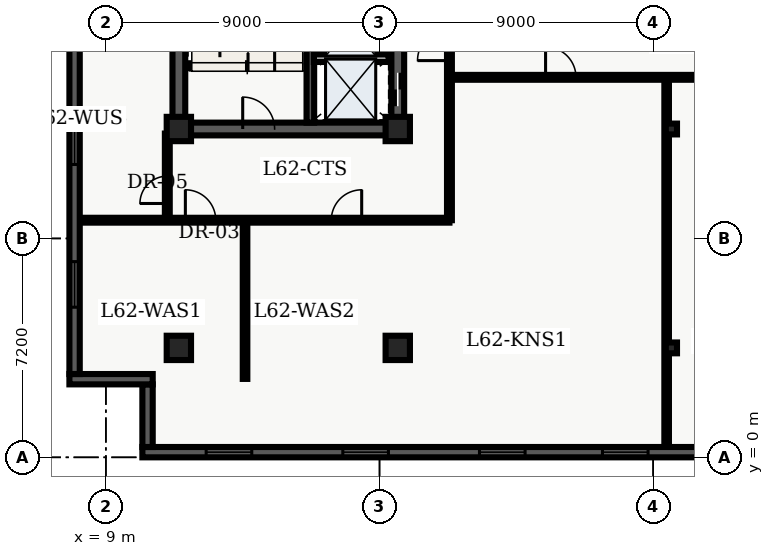
"""IFC4 building model, lengths in metres.
Left out: names, types, materials, properties, quantities, classifications, styles, units other than length and angle.
Written with IfcOpenShell. Run it as: python <this file> out.ifc"""

import sys

from ifc_helpers import new_model, entity, si_unit, converted_unit, direction, frame, origin_with_axes, origin_2d_with_axis, place, context, subcontext, project, spatial, polyline, rectangle, i_section, outline, extrude, element, fill, save


model = new_model("IFC4")
c1 = context("Model", 3, precision=1e-05, world=origin_with_axes(), true_north=direction((0.0, 1.0)))
c2 = subcontext(c1, "Body", "Model", "MODEL_VIEW")
j1 = project(units=[si_unit("LENGTHUNIT", "METRE"), converted_unit("PLANEANGLEUNIT", "DEGREE", entity("IfcPlaneAngleMeasure", 0.017), si_unit("PLANEANGLEUNIT", "RADIAN"), dimensions=[0, 0, 0, 0, 0, 0, 0])], contexts=[c1])
p1 = place(None, origin_with_axes())
s1 = spatial("IfcSite", under=j1, at=p1, CompositionType="ELEMENT")
p2 = place(p1, origin_with_axes())
s2 = spatial("IfcBuilding", under=s1, at=p2, CompositionType="ELEMENT")
p3 = place(p2, frame((0.0, 0.0, 252.9), z_axis=(0.0, 0.0, 1.0), x_axis=(1.0, 0.0, 0.0)))
s3 = spatial("IfcBuildingStorey", under=s2, at=p3, CompositionType="ELEMENT", Elevation=252.9)
p4 = place(p3, frame((11.4, 10.8, 0.0), z_axis=(0.0, 0.0, 1.0), x_axis=(0.0, 1.0, 0.0)))
e1 = element("IfcWall", 1, at=p4, inside=s3, PredefinedType="SHEAR", context=c2, shape_type="SweptSolid", body=[
    extrude(outline(polyline([(0.0, -0.21), (27.0, -0.21), (27.0, 0.21), (0.0, 0.21), (0.0, -0.21)])), origin_with_axes(), (0.0, 0.0, 1.0), 3.66),
])
p5 = place(p3, frame((11.4, 10.8, 0.0), z_axis=(0.0, 0.0, 1.0), x_axis=(1.0, 0.0, 0.0)))
e2 = element("IfcWall", 2, at=p5, inside=s3, PredefinedType="SHEAR", context=c2, shape_type="SweptSolid", body=[
    extrude(outline(polyline([(0.0, -0.21), (7.2, -0.21), (7.2, 0.21), (0.0, 0.21), (0.0, -0.21)])), origin_with_axes(), (0.0, 0.0, 1.0), 3.66),
])
p6 = place(p5, frame((2.625, 0.0, 0.0), z_axis=(0.0, 0.0, 1.0), x_axis=(1.0, 0.0, 0.0)))
e3 = element("IfcOpeningElement", 3, at=p6, cuts=e2, PredefinedType="OPENING", context=c2, shape_type="SweptSolid", body=[
    extrude(rectangle(XDim=1.05, YDim=0.44, at=origin_2d_with_axis()), origin_with_axes(), (0.0, 0.0, 1.0), 2.15),
])
p7 = place(p3, frame((18.6, 10.8, 0.0), z_axis=(0.0, 0.0, 1.0), x_axis=(0.0, 1.0, 0.0)))
e4 = element("IfcWall", 4, at=p7, inside=s3, PredefinedType="SHEAR", context=c2, shape_type="SweptSolid", body=[
    extrude(outline(polyline([(0.0, -0.21), (13.5, -0.21), (13.5, 0.21), (0.0, 0.21), (0.0, -0.21)])), origin_with_axes(), (0.0, 0.0, 1.0), 3.66),
])
p8 = place(p7, frame((1.3, 0.0, 0.0), z_axis=(0.0, 0.0, 1.0), x_axis=(1.0, 0.0, 0.0)))
e5 = element("IfcOpeningElement", 5, at=p8, cuts=e4, PredefinedType="OPENING", context=c2, shape_type="SweptSolid", body=[
    extrude(rectangle(XDim=1.1, YDim=0.44, at=origin_2d_with_axis()), origin_with_axes(), (0.0, 0.0, 1.0), 2.15),
])
p9 = place(p7, frame((3.4, 0.0, 0.0), z_axis=(0.0, 0.0, 1.0), x_axis=(1.0, 0.0, 0.0)))
e6 = element("IfcOpeningElement", 6, at=p9, cuts=e4, PredefinedType="OPENING", context=c2, shape_type="SweptSolid", body=[
    extrude(rectangle(XDim=1.1, YDim=0.44, at=origin_2d_with_axis()), origin_with_axes(), (0.0, 0.0, 1.0), 2.15),
])
p10 = place(p7, frame((11.125, 0.0, 0.0), z_axis=(0.0, 0.0, 1.0), x_axis=(1.0, 0.0, 0.0)))
e7 = element("IfcOpeningElement", 7, at=p10, cuts=e4, PredefinedType="OPENING", context=c2, shape_type="SweptSolid", body=[
    extrude(rectangle(XDim=1.05, YDim=0.44, at=origin_2d_with_axis()), origin_with_axes(), (0.0, 0.0, 1.0), 2.15),
])
p11 = place(p7, frame((6.675, 0.0, 0.0), z_axis=(0.0, 0.0, 1.0), x_axis=(1.0, 0.0, 0.0)))
e8 = element("IfcOpeningElement", 8, at=p11, cuts=e4, PredefinedType="OPENING", context=c2, shape_type="SweptSolid", body=[
    extrude(rectangle(XDim=0.95, YDim=0.44, at=origin_2d_with_axis()), origin_with_axes(), (0.0, 0.0, 1.0), 2.15),
])
p12 = place(p3, frame((15.725, 11.01, 0.0), z_axis=(0.0, 0.0, 1.0), x_axis=(0.0, 1.0, 0.0)))
e9 = element("IfcWall", 9, at=p12, inside=s3, PredefinedType="SHEAR", context=c2, shape_type="SweptSolid", body=[
    extrude(outline(polyline([(0.0, -0.125), (8.69, -0.125), (8.69, 0.125), (0.0, 0.125), (0.0, -0.125)])), origin_with_axes(), (0.0, 0.0, 1.0), 3.66),
])
for number, where, z_axis, x_axis in (
    (10, (11.4, 3.6, 0.0), (0.0, 0.0, 1.0), (1.0, 0.0, 0.0)),
    (11, (11.4, 10.8, 0.0), (0.0, 0.0, 1.0), (1.0, 0.0, 0.0)),
    (12, (18.6, 3.6, 0.0), (0.0, 0.0, 1.0), (1.0, 0.0, 0.0)),
    (13, (18.6, 10.8, 0.0), (0.0, 0.0, 1.0), (1.0, 0.0, 0.0)),
):
    element("IfcColumn", number, at=place(p3, frame(where, z_axis=z_axis, x_axis=x_axis)), inside=s3, PredefinedType="COLUMN", context=c2, shape_type="SweptSolid", body=[
        extrude(rectangle(XDim=0.8, YDim=0.8, at=origin_2d_with_axis()), origin_with_axes(), (0.0, 0.0, 1.0), 3.9),
    ])
for number, where, z_axis, x_axis in (
    (14, (27.6, 3.6, 0.0), (0.0, 0.0, 1.0), (1.0, 0.0, 0.0)),
    (15, (27.6, 10.8, 0.0), (0.0, 0.0, 1.0), (1.0, 0.0, 0.0)),
):
    element("IfcColumn", number, at=place(p3, frame(where, z_axis=z_axis, x_axis=x_axis)), inside=s3, PredefinedType="COLUMN", context=c2, shape_type="SweptSolid", body=[
        extrude(i_section(OverallWidth=0.369, OverallDepth=0.356, WebThickness=0.011, FlangeThickness=0.018, FilletRadius=0.018, at=origin_2d_with_axis()), origin_with_axes(), (0.0, 0.0, 1.0), 3.9),
    ])
p13 = place(p3, frame((15.84, 13.13, 0.0), z_axis=(0.0, 0.0, 1.0), x_axis=(1.0, 0.0, 0.0)))
e16 = element("IfcWall", 16, at=p13, inside=s3, PredefinedType="SOLIDWALL", context=c2, shape_type="SweptSolid", body=[
    extrude(outline(polyline([(0.0, -0.125), (2.46, -0.125), (2.46, 0.125), (0.0, 0.125), (0.0, -0.125)])), origin_with_axes(), (0.0, 0.0, 1.0), 2.7),
])
p14 = place(p3, frame((8.135, 7.8, 0.0), z_axis=(0.0, 0.0, 1.0), x_axis=(1.0, 0.0, 0.0)))
e17 = element("IfcWall", 17, at=p14, inside=s3, PredefinedType="PARTITIONING", context=c2, shape_type="SweptSolid", body=[
    extrude(outline(polyline([(0.0, -0.08), (12.165, -0.08), (12.165, 0.08), (0.0, 0.08), (0.0, -0.08)])), origin_with_axes(), (0.0, 0.0, 1.0), 2.7),
])
p15 = place(p14, frame((3.979, 0.0, 0.0), z_axis=(0.0, 0.0, 1.0), x_axis=(1.0, 0.0, 0.0)))
e18 = element("IfcOpeningElement", 18, at=p15, cuts=e17, PredefinedType="OPENING", context=c2, shape_type="SweptSolid", body=[
    extrude(rectangle(XDim=1.0, YDim=0.18, at=origin_2d_with_axis()), origin_with_axes(), (0.0, 0.0, 1.0), 2.15),
])
p16 = place(p14, frame((8.778, 0.0, 0.0), z_axis=(0.0, 0.0, 1.0), x_axis=(1.0, 0.0, 0.0)))
e19 = element("IfcOpeningElement", 19, at=p16, cuts=e17, PredefinedType="OPENING", context=c2, shape_type="SweptSolid", body=[
    extrude(rectangle(XDim=1.0, YDim=0.18, at=origin_2d_with_axis()), origin_with_axes(), (0.0, 0.0, 1.0), 2.15),
])
p17 = place(p3, frame((20.3, 7.8, 0.0), z_axis=(0.0, 0.0, 1.0), x_axis=(0.0, 1.0, 0.0)))
e20 = element("IfcWall", 20, at=p17, inside=s3, PredefinedType="PARTITIONING", context=c2, shape_type="SweptSolid", body=[
    extrude(outline(polyline([(0.0, -0.08), (32.7, -0.08), (32.7, 0.08), (0.0, 0.08), (0.0, -0.08)])), origin_with_axes(), (0.0, 0.0, 1.0), 2.7),
])
p18 = place(p17, frame((17.825, 0.0, 0.0), z_axis=(0.0, 0.0, 1.0), x_axis=(1.0, 0.0, 0.0)))
e21 = element("IfcOpeningElement", 21, at=p18, cuts=e20, PredefinedType="OPENING", context=c2, shape_type="SweptSolid", body=[
    extrude(rectangle(XDim=1.0, YDim=0.18, at=origin_2d_with_axis()), origin_with_axes(), (0.0, 0.0, 1.0), 2.15),
])
p19 = place(p17, frame((27.345, 0.0, 0.0), z_axis=(0.0, 0.0, 1.0), x_axis=(1.0, 0.0, 0.0)))
e22 = element("IfcOpeningElement", 22, at=p19, cuts=e20, PredefinedType="OPENING", context=c2, shape_type="SweptSolid", body=[
    extrude(rectangle(XDim=1.0, YDim=0.18, at=origin_2d_with_axis()), origin_with_axes(), (0.0, 0.0, 1.0), 2.15),
])
p20 = place(p17, frame((5.775, 0.0, 0.0), z_axis=(0.0, 0.0, 1.0), x_axis=(1.0, 0.0, 0.0)))
e23 = element("IfcOpeningElement", 23, at=p20, cuts=e20, PredefinedType="OPENING", context=c2, shape_type="SweptSolid", body=[
    extrude(rectangle(XDim=1.05, YDim=0.18, at=origin_2d_with_axis()), origin_with_axes(), (0.0, 0.0, 1.0), 2.15),
])
p21 = place(p3, frame((11.02, 7.8, 0.0), z_axis=(0.0, 0.0, 1.0), x_axis=(0.0, 1.0, 0.0)))
e24 = element("IfcWall", 24, at=p21, inside=s3, PredefinedType="PARTITIONING", context=c2, shape_type="SweptSolid", body=[
    extrude(outline(polyline([(0.0, -0.08), (2.85, -0.08), (2.85, 0.08), (0.0, 0.08), (0.0, -0.08)])), origin_with_axes(), (0.0, 0.0, 1.0), 2.7),
])
p22 = place(p21, frame((1.0, 0.0, 0.0), z_axis=(0.0, 0.0, 1.0), x_axis=(1.0, 0.0, 0.0)))
e25 = element("IfcOpeningElement", 25, at=p22, cuts=e24, PredefinedType="OPENING", context=c2, shape_type="SweptSolid", body=[
    extrude(rectangle(XDim=0.9, YDim=0.18, at=origin_2d_with_axis()), origin_with_axes(), (0.0, 0.0, 1.0), 2.15),
])
p23 = place(p3, frame((13.577, 2.58, 0.0), z_axis=(0.0, 0.0, 1.0), x_axis=(0.0, 1.0, 0.0)))
e26 = element("IfcWall", 26, at=p23, inside=s3, PredefinedType="PARTITIONING", context=c2, shape_type="SweptSolid", body=[
    extrude(outline(polyline([(0.0, -0.075), (5.12, -0.075), (5.12, 0.075), (0.0, 0.075), (0.0, -0.075)])), origin_with_axes(), (0.0, 0.0, 1.0), 2.7),
])
p24 = place(p3, frame((20.3, 12.5, 0.0), z_axis=(0.0, 0.0, 1.0), x_axis=(1.0, 0.0, 0.0)))
e27 = element("IfcWall", 27, at=p24, inside=s3, PredefinedType="PARTITIONING", context=c2, shape_type="SweptSolid", body=[
    extrude(outline(polyline([(0.0, -0.08), (16.05, -0.08), (16.05, 0.08), (0.0, 0.08), (0.0, -0.08)])), origin_with_axes(), (0.0, 0.0, 1.0), 2.7),
])
p25 = place(p24, frame((3.662, 0.0, 0.0), z_axis=(0.0, 0.0, 1.0), x_axis=(1.0, 0.0, 0.0)))
e28 = element("IfcOpeningElement", 28, at=p25, cuts=e27, PredefinedType="OPENING", context=c2, shape_type="SweptSolid", body=[
    extrude(rectangle(XDim=1.0, YDim=0.18, at=origin_2d_with_axis()), origin_with_axes(), (0.0, 0.0, 1.0), 2.15),
])
p26 = place(p24, frame((11.557, 0.0, 0.0), z_axis=(0.0, 0.0, 1.0), x_axis=(1.0, 0.0, 0.0)))
e29 = element("IfcOpeningElement", 29, at=p26, cuts=e27, PredefinedType="OPENING", context=c2, shape_type="SweptSolid", body=[
    extrude(rectangle(XDim=1.0, YDim=0.18, at=origin_2d_with_axis()), origin_with_axes(), (0.0, 0.0, 1.0), 2.15),
])
p27 = place(p3, frame((27.444, 0.335, 0.0), z_axis=(0.0, 0.0, 1.0), x_axis=(0.0, 1.0, 0.0)))
e30 = element("IfcWall", 30, at=p27, inside=s3, PredefinedType="PARTITIONING", context=c2, shape_type="SweptSolid", body=[
    extrude(outline(polyline([(0.0, -0.075), (12.045, -0.075), (12.045, 0.075), (0.0, 0.075), (0.0, -0.075)])), origin_with_axes(), (0.0, 0.0, 1.0), 2.7),
])
p28 = place(p3, frame((47.36, 0.17, 0.0), z_axis=(0.0, 0.0, 1.0), x_axis=(-1.0, 0.0, 0.0)))
e31 = element("IfcWall", 31, at=p28, inside=s3, PredefinedType="SOLIDWALL", context=c2, shape_type="SweptSolid", body=[
    extrude(outline(polyline([(0.0, -0.17), (37.16, -0.17), (37.16, 0.17), (0.0, 0.17), (0.0, -0.17)])), origin_with_axes(), (0.0, 0.0, 1.0), 3.66),
])
p29 = place(p28, frame((2.847, 0.0, 0.45), z_axis=(0.0, 0.0, 1.0), x_axis=(1.0, 0.0, 0.0)))
e32 = element("IfcOpeningElement", 32, at=p29, cuts=e31, PredefinedType="OPENING", context=c2, shape_type="SweptSolid", body=[
    extrude(rectangle(XDim=1.5, YDim=0.36, at=origin_2d_with_axis()), origin_with_axes(), (0.0, 0.0, 1.0), 2.1),
])
p30 = place(p28, frame((7.342, 0.0, 0.45), z_axis=(0.0, 0.0, 1.0), x_axis=(1.0, 0.0, 0.0)))
e33 = element("IfcOpeningElement", 33, at=p30, cuts=e31, PredefinedType="OPENING", context=c2, shape_type="SweptSolid", body=[
    extrude(rectangle(XDim=1.5, YDim=0.36, at=origin_2d_with_axis()), origin_with_axes(), (0.0, 0.0, 1.0), 2.1),
])
p31 = place(p28, frame((11.837, 0.0, 0.45), z_axis=(0.0, 0.0, 1.0), x_axis=(1.0, 0.0, 0.0)))
e34 = element("IfcOpeningElement", 34, at=p31, cuts=e31, PredefinedType="OPENING", context=c2, shape_type="SweptSolid", body=[
    extrude(rectangle(XDim=1.5, YDim=0.36, at=origin_2d_with_axis()), origin_with_axes(), (0.0, 0.0, 1.0), 2.1),
])
p32 = place(p28, frame((16.332, 0.0, 0.45), z_axis=(0.0, 0.0, 1.0), x_axis=(1.0, 0.0, 0.0)))
e35 = element("IfcOpeningElement", 35, at=p32, cuts=e31, PredefinedType="OPENING", context=c2, shape_type="SweptSolid", body=[
    extrude(rectangle(XDim=1.5, YDim=0.36, at=origin_2d_with_axis()), origin_with_axes(), (0.0, 0.0, 1.0), 2.1),
])
p33 = place(p28, frame((21.277, 0.0, 0.45), z_axis=(0.0, 0.0, 1.0), x_axis=(1.0, 0.0, 0.0)))
e36 = element("IfcOpeningElement", 36, at=p33, cuts=e31, PredefinedType="OPENING", context=c2, shape_type="SweptSolid", body=[
    extrude(rectangle(XDim=1.5, YDim=0.36, at=origin_2d_with_axis()), origin_with_axes(), (0.0, 0.0, 1.0), 2.1),
])
p34 = place(p28, frame((25.322, 0.0, 0.45), z_axis=(0.0, 0.0, 1.0), x_axis=(1.0, 0.0, 0.0)))
e37 = element("IfcOpeningElement", 37, at=p34, cuts=e31, PredefinedType="OPENING", context=c2, shape_type="SweptSolid", body=[
    extrude(rectangle(XDim=1.5, YDim=0.36, at=origin_2d_with_axis()), origin_with_axes(), (0.0, 0.0, 1.0), 2.1),
])
p35 = place(p28, frame((29.817, 0.0, 0.45), z_axis=(0.0, 0.0, 1.0), x_axis=(1.0, 0.0, 0.0)))
e38 = element("IfcOpeningElement", 38, at=p35, cuts=e31, PredefinedType="OPENING", context=c2, shape_type="SweptSolid", body=[
    extrude(rectangle(XDim=1.5, YDim=0.36, at=origin_2d_with_axis()), origin_with_axes(), (0.0, 0.0, 1.0), 2.1),
])
p36 = place(p28, frame((34.312, 0.0, 0.45), z_axis=(0.0, 0.0, 1.0), x_axis=(1.0, 0.0, 0.0)))
e39 = element("IfcOpeningElement", 39, at=p36, cuts=e31, PredefinedType="OPENING", context=c2, shape_type="SweptSolid", body=[
    extrude(rectangle(XDim=1.5, YDim=0.36, at=origin_2d_with_axis()), origin_with_axes(), (0.0, 0.0, 1.0), 2.1),
])
p37 = place(p3, frame((10.37, 0.34, 0.0), z_axis=(0.0, 0.0, 1.0), x_axis=(0.0, 1.0, 0.0)))
e40 = element("IfcWall", 40, at=p37, inside=s3, PredefinedType="SOLIDWALL", context=c2, shape_type="SweptSolid", body=[
    extrude(outline(polyline([(0.0, -0.17), (2.06, -0.17), (2.06, 0.17), (0.0, 0.17), (0.0, -0.17)])), origin_with_axes(), (0.0, 0.0, 1.0), 3.66),
])
p38 = place(p3, frame((10.54, 2.57, 0.0), z_axis=(0.0, 0.0, 1.0), x_axis=(-1.0, 0.0, 0.0)))
e41 = element("IfcWall", 41, at=p38, inside=s3, PredefinedType="SOLIDWALL", context=c2, shape_type="SweptSolid", body=[
    extrude(outline(polyline([(0.0, -0.17), (2.74, -0.17), (2.74, 0.17), (0.0, 0.17), (0.0, -0.17)])), origin_with_axes(), (0.0, 0.0, 1.0), 3.66),
])
p39 = place(p3, frame((7.97, 2.74, 0.0), z_axis=(0.0, 0.0, 1.0), x_axis=(0.0, 1.0, 0.0)))
e42 = element("IfcWall", 42, at=p39, inside=s3, PredefinedType="SOLIDWALL", context=c2, shape_type="SweptSolid", body=[
    extrude(outline(polyline([(0.0, -0.17), (43.46, -0.17), (43.46, 0.17), (0.0, 0.17), (0.0, -0.17)])), origin_with_axes(), (0.0, 0.0, 1.0), 3.66),
])
p40 = place(p39, frame((2.948, 0.0, 0.45), z_axis=(0.0, 0.0, 1.0), x_axis=(1.0, 0.0, 0.0)))
e43 = element("IfcOpeningElement", 43, at=p40, cuts=e42, PredefinedType="OPENING", context=c2, shape_type="SweptSolid", body=[
    extrude(rectangle(XDim=1.5, YDim=0.36, at=origin_2d_with_axis()), origin_with_axes(), (0.0, 0.0, 1.0), 2.1),
])
p41 = place(p39, frame((7.643, 0.0, 0.45), z_axis=(0.0, 0.0, 1.0), x_axis=(1.0, 0.0, 0.0)))
e44 = element("IfcOpeningElement", 44, at=p41, cuts=e42, PredefinedType="OPENING", context=c2, shape_type="SweptSolid", body=[
    extrude(rectangle(XDim=1.5, YDim=0.36, at=origin_2d_with_axis()), origin_with_axes(), (0.0, 0.0, 1.0), 2.1),
])
p42 = place(p39, frame((13.189, 0.0, 0.45), z_axis=(0.0, 0.0, 1.0), x_axis=(1.0, 0.0, 0.0)))
e45 = element("IfcOpeningElement", 45, at=p42, cuts=e42, PredefinedType="OPENING", context=c2, shape_type="SweptSolid", body=[
    extrude(rectangle(XDim=1.5, YDim=0.36, at=origin_2d_with_axis()), origin_with_axes(), (0.0, 0.0, 1.0), 2.1),
])
p43 = place(p39, frame((17.034, 0.0, 0.45), z_axis=(0.0, 0.0, 1.0), x_axis=(1.0, 0.0, 0.0)))
e46 = element("IfcOpeningElement", 46, at=p43, cuts=e42, PredefinedType="OPENING", context=c2, shape_type="SweptSolid", body=[
    extrude(rectangle(XDim=1.5, YDim=0.36, at=origin_2d_with_axis()), origin_with_axes(), (0.0, 0.0, 1.0), 2.1),
])
p44 = place(p39, frame((21.73, 0.0, 0.45), z_axis=(0.0, 0.0, 1.0), x_axis=(1.0, 0.0, 0.0)))
e47 = element("IfcOpeningElement", 47, at=p44, cuts=e42, PredefinedType="OPENING", context=c2, shape_type="SweptSolid", body=[
    extrude(rectangle(XDim=1.5, YDim=0.36, at=origin_2d_with_axis()), origin_with_axes(), (0.0, 0.0, 1.0), 2.1),
])
p45 = place(p39, frame((26.426, 0.0, 0.45), z_axis=(0.0, 0.0, 1.0), x_axis=(1.0, 0.0, 0.0)))
e48 = element("IfcOpeningElement", 48, at=p45, cuts=e42, PredefinedType="OPENING", context=c2, shape_type="SweptSolid", body=[
    extrude(rectangle(XDim=1.5, YDim=0.36, at=origin_2d_with_axis()), origin_with_axes(), (0.0, 0.0, 1.0), 2.1),
])
p46 = place(p39, frame((35.817, 0.0, 0.45), z_axis=(0.0, 0.0, 1.0), x_axis=(1.0, 0.0, 0.0)))
e49 = element("IfcOpeningElement", 49, at=p46, cuts=e42, PredefinedType="OPENING", context=c2, shape_type="SweptSolid", body=[
    extrude(rectangle(XDim=1.5, YDim=0.36, at=origin_2d_with_axis()), origin_with_axes(), (0.0, 0.0, 1.0), 2.1),
])
p47 = place(p39, frame((40.512, 0.0, 0.45), z_axis=(0.0, 0.0, 1.0), x_axis=(1.0, 0.0, 0.0)))
e50 = element("IfcOpeningElement", 50, at=p47, cuts=e42, PredefinedType="OPENING", context=c2, shape_type="SweptSolid", body=[
    extrude(rectangle(XDim=1.5, YDim=0.36, at=origin_2d_with_axis()), origin_with_axes(), (0.0, 0.0, 1.0), 2.1),
])
p48 = place(p7, frame((1.3, 0.0, 0.0), z_axis=(0.0, 0.0, 1.0), x_axis=(1.0, 0.0, 0.0)))
e51 = element("IfcDoor", 51, at=p48, inside=s3, OperationType="SLIDING_TO_LEFT", PredefinedType="DOOR", context=c2, shape_type="SweptSolid", body=[
    extrude(rectangle(XDim=1.1, YDim=0.09, at=origin_2d_with_axis()), origin_with_axes(), (0.0, 0.0, 1.0), 2.15),
])
fill(e5, e51)
p49 = place(p5, frame((2.625, 0.0, 0.0), z_axis=(0.0, 0.0, 1.0), x_axis=(1.0, 0.0, 0.0)))
e52 = element("IfcDoor", 52, at=p49, inside=s3, OperationType="SINGLE_SWING_LEFT", PredefinedType="DOOR", context=c2, shape_type="SweptSolid", body=[
    extrude(rectangle(XDim=1.05, YDim=0.09, at=origin_2d_with_axis()), origin_with_axes(), (0.0, 0.0, 1.0), 2.15),
])
fill(e3, e52)
p50 = place(p21, frame((1.0, 0.0, 0.0), z_axis=(0.0, 0.0, 1.0), x_axis=(1.0, 0.0, 0.0)))
e53 = element("IfcDoor", 53, at=p50, inside=s3, OperationType="SINGLE_SWING_LEFT", PredefinedType="DOOR", context=c2, shape_type="SweptSolid", body=[
    extrude(rectangle(XDim=0.9, YDim=0.09, at=origin_2d_with_axis()), origin_with_axes(), (0.0, 0.0, 1.0), 2.15),
])
fill(e25, e53)
p51 = place(p14, frame((3.979, 0.0, 0.0), z_axis=(0.0, 0.0, 1.0), x_axis=(1.0, 0.0, 0.0)))
e54 = element("IfcDoor", 54, at=p51, inside=s3, OperationType="SINGLE_SWING_LEFT", PredefinedType="DOOR", context=c2, shape_type="SweptSolid", body=[
    extrude(rectangle(XDim=1.0, YDim=0.09, at=origin_2d_with_axis()), origin_with_axes(), (0.0, 0.0, 1.0), 2.15),
])
fill(e18, e54)
p52 = place(p14, frame((8.778, 0.0, 0.0), z_axis=(0.0, 0.0, 1.0), x_axis=(1.0, 0.0, 0.0)))
e55 = element("IfcDoor", 55, at=p52, inside=s3, OperationType="SINGLE_SWING_RIGHT", PredefinedType="DOOR", context=c2, shape_type="SweptSolid", body=[
    extrude(rectangle(XDim=1.0, YDim=0.09, at=origin_2d_with_axis()), origin_with_axes(), (0.0, 0.0, 1.0), 2.15),
])
fill(e19, e55)
p53 = place(p17, frame((5.775, 0.0, 0.0), z_axis=(0.0, 0.0, 1.0), x_axis=(1.0, 0.0, 0.0)))
e56 = element("IfcDoor", 56, at=p53, inside=s3, OperationType="SINGLE_SWING_LEFT", PredefinedType="DOOR", context=c2, shape_type="SweptSolid", body=[
    extrude(rectangle(XDim=1.05, YDim=0.09, at=origin_2d_with_axis()), origin_with_axes(), (0.0, 0.0, 1.0), 2.15),
])
fill(e23, e56)
p54 = place(p24, frame((3.662, 0.0, 0.0), z_axis=(0.0, 0.0, 1.0), x_axis=(1.0, 0.0, 0.0)))
e57 = element("IfcDoor", 57, at=p54, inside=s3, OperationType="SINGLE_SWING_LEFT", PredefinedType="DOOR", context=c2, shape_type="SweptSolid", body=[
    extrude(rectangle(XDim=1.0, YDim=0.09, at=origin_2d_with_axis()), origin_with_axes(), (0.0, 0.0, 1.0), 2.15),
])
fill(e28, e57)
p55 = place(p28, frame((21.277, 0.0, 0.45), z_axis=(0.0, 0.0, 1.0), x_axis=(1.0, 0.0, 0.0)))
e58 = element("IfcWindow", 58, at=p55, inside=s3, PredefinedType="WINDOW", context=c2, shape_type="SweptSolid", body=[
    extrude(rectangle(XDim=1.5, YDim=0.09, at=origin_2d_with_axis()), origin_with_axes(), (0.0, 0.0, 1.0), 2.1),
])
fill(e36, e58)
p56 = place(p28, frame((25.322, 0.0, 0.45), z_axis=(0.0, 0.0, 1.0), x_axis=(1.0, 0.0, 0.0)))
e59 = element("IfcWindow", 59, at=p56, inside=s3, PredefinedType="WINDOW", context=c2, shape_type="SweptSolid", body=[
    extrude(rectangle(XDim=1.5, YDim=0.09, at=origin_2d_with_axis()), origin_with_axes(), (0.0, 0.0, 1.0), 2.1),
])
fill(e37, e59)
p57 = place(p28, frame((29.817, 0.0, 0.45), z_axis=(0.0, 0.0, 1.0), x_axis=(1.0, 0.0, 0.0)))
e60 = element("IfcWindow", 60, at=p57, inside=s3, PredefinedType="WINDOW", context=c2, shape_type="SweptSolid", body=[
    extrude(rectangle(XDim=1.5, YDim=0.09, at=origin_2d_with_axis()), origin_with_axes(), (0.0, 0.0, 1.0), 2.1),
])
fill(e38, e60)
p58 = place(p28, frame((34.312, 0.0, 0.45), z_axis=(0.0, 0.0, 1.0), x_axis=(1.0, 0.0, 0.0)))
e61 = element("IfcWindow", 61, at=p58, inside=s3, PredefinedType="WINDOW", context=c2, shape_type="SweptSolid", body=[
    extrude(rectangle(XDim=1.5, YDim=0.09, at=origin_2d_with_axis()), origin_with_axes(), (0.0, 0.0, 1.0), 2.1),
])
fill(e39, e61)
p59 = place(p39, frame((2.948, 0.0, 0.45), z_axis=(0.0, 0.0, 1.0), x_axis=(1.0, 0.0, 0.0)))
e62 = element("IfcWindow", 62, at=p59, inside=s3, PredefinedType="WINDOW", context=c2, shape_type="SweptSolid", body=[
    extrude(rectangle(XDim=1.5, YDim=0.09, at=origin_2d_with_axis()), origin_with_axes(), (0.0, 0.0, 1.0), 2.1),
])
fill(e43, e62)
p60 = place(p39, frame((7.643, 0.0, 0.45), z_axis=(0.0, 0.0, 1.0), x_axis=(1.0, 0.0, 0.0)))
e63 = element("IfcWindow", 63, at=p60, inside=s3, PredefinedType="WINDOW", context=c2, shape_type="SweptSolid", body=[
    extrude(rectangle(XDim=1.5, YDim=0.09, at=origin_2d_with_axis()), origin_with_axes(), (0.0, 0.0, 1.0), 2.1),
])
fill(e44, e63)
save(model, sys.argv[1])
